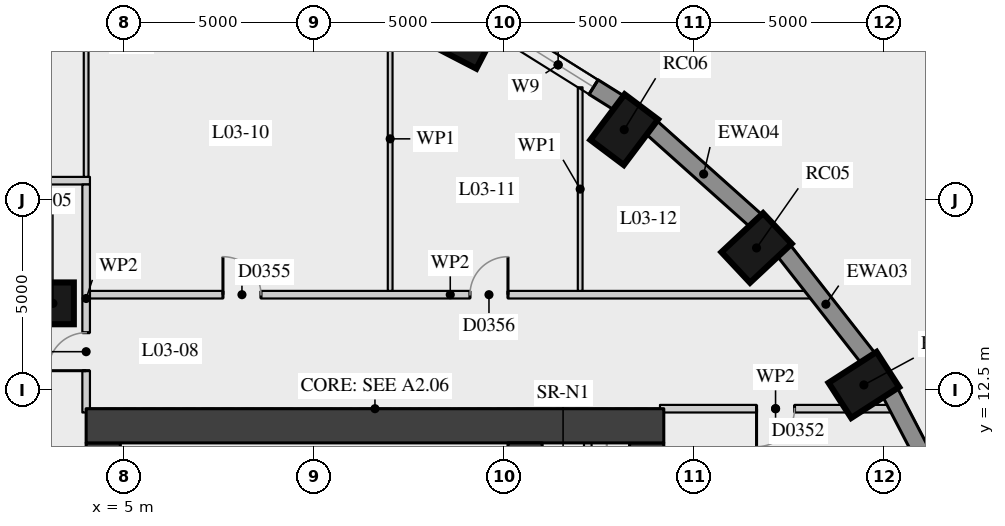
"""IFC4 building model, lengths in metres.
Left out: names, types, materials, properties, quantities, classifications, styles, units other than length and angle.
Written with IfcOpenShell. Run it as: python <this file> out.ifc"""

import sys

from ifc_helpers import new_model, si_unit, direction, frame, frame_2d, origin, origin_2d, place, context, subcontext, project, spatial, rectangle, extrude, element, fill, save


model = new_model("IFC4")
c1 = context("Model", 3, precision=1e-05, world=origin(), true_north=direction((0.0, 1.0)))
c2 = subcontext(c1, "Body", "Model", "MODEL_VIEW")
j1 = project(units=[si_unit("LENGTHUNIT", "METRE"), si_unit("PLANEANGLEUNIT", "RADIAN")], contexts=[c1])
p1 = place(None, origin())
s1 = spatial("IfcSite", under=j1, at=p1, CompositionType="ELEMENT")
p2 = place(p1, origin())
s2 = spatial("IfcBuilding", under=s1, at=p2, CompositionType="ELEMENT")
p3 = place(p2, frame((0.0, 0.0, 17.5)))
s3 = spatial("IfcBuildingStorey", under=s2, at=p3, CompositionType="ELEMENT", Elevation=17.5)
for number, where, z_axis, x_axis in (
    (1, (24.465, 12.625, 0.0), (0.0, 0.0, 1.0), (0.841, 0.541, 0.0)),
    (2, (21.641, 16.23, 0.0), (0.0, 0.0, 1.0), (0.73, 0.683, 0.0)),
    (3, (18.159, 19.343, 0.0), (0.0, 0.0, 1.0), (0.601, 0.799, 0.0)),
    (4, (14.125, 21.867, 0.0), (0.0, 0.0, 1.0), (0.46, 0.888, 0.0)),
):
    element("IfcColumn", number, at=place(p3, frame(where, z_axis=z_axis, x_axis=x_axis)), inside=s3, PredefinedType="COLUMN", context=c2, shape_type="SweptSolid", body=[
        extrude(rectangle(XDim=1.5, YDim=1.1, at=origin_2d()), origin(), (0.0, 0.0, 1.0), 4.2),
    ])
p4 = place(p3, frame((3.126, 14.772, 0.0), z_axis=(0.0, 0.0, 1.0), x_axis=(1.0, 0.0, 0.0)))
e5 = element("IfcColumn", 5, at=p4, inside=s3, PredefinedType="COLUMN", context=c2, shape_type="SweptSolid", body=[
    extrude(rectangle(XDim=1.1, YDim=1.1, at=origin_2d()), origin(), (0.0, 0.0, 1.0), 4.2),
])
p5 = place(p3, frame((26.786, 9.305, 0.0), z_axis=(0.0, 0.0, 1.0), x_axis=(-0.462492775226, 0.886623050041, 0.0)))
e6 = element("IfcWall", 6, at=p5, inside=s3, PredefinedType="SOLIDWALL", context=c2, shape_type="SweptSolid", body=[
    extrude(rectangle(XDim=3.532, YDim=0.45, at=frame_2d((1.766, 0.0))), origin(), (0.0, 0.0, 1.0), 3.92),
])
p6 = place(p3, frame((24.578, 13.328, 0.0), z_axis=(0.0, 0.0, 1.0), x_axis=(-0.616661975264, 0.787228053529, 0.0)))
e7 = element("IfcWall", 7, at=p6, inside=s3, PredefinedType="SOLIDWALL", context=c2, shape_type="SweptSolid", body=[
    extrude(rectangle(XDim=3.61, YDim=0.45, at=frame_2d((1.805, 0.0))), origin(), (0.0, 0.0, 1.0), 3.92),
])
p7 = place(p3, frame((21.627, 16.943, 0.0), z_axis=(0.0, 0.0, 1.0), x_axis=(-0.745526233716, 0.66647628228, 0.0)))
e8 = element("IfcWall", 8, at=p7, inside=s3, PredefinedType="SOLIDWALL", context=c2, shape_type="SweptSolid", body=[
    extrude(rectangle(XDim=3.697, YDim=0.45, at=frame_2d((1.848, 0.0))), origin(), (0.0, 0.0, 1.0), 3.92),
])
p8 = place(p3, frame((18.023, 20.044, 0.0), z_axis=(0.0, 0.0, 1.0), x_axis=(-0.847635480093, 0.530579016629, 0.0)))
e9 = element("IfcWall", 9, at=p8, inside=s3, PredefinedType="SOLIDWALL", context=c2, shape_type="SweptSolid", body=[
    extrude(rectangle(XDim=3.782, YDim=0.45, at=frame_2d((1.891, 0.0))), origin(), (0.0, 0.0, 1.0), 3.92),
])
p9 = place(p8, frame((0.791, 0.0, 0.4)))
e10 = element("IfcOpeningElement", 10, at=p9, cuts=e9, PredefinedType="OPENING", context=c2, shape_type="SweptSolid", body=[
    extrude(rectangle(XDim=2.2, YDim=2.8, at=frame_2d((1.1, 1.4))), frame((0.0, 0.235, 0.0), z_axis=(0.0, -1.0, 0.0), x_axis=(1.0, 0.0, 0.0)), (0.0, 0.0, 1.0), 0.47),
])
p10 = place(p3, frame((4.45, -11.1, 0.0), z_axis=(0.0, 0.0, 1.0), x_axis=(0.0, 1.0, 0.0)))
e11 = element("IfcWall", 11, at=p10, inside=s3, PredefinedType="SHEAR", context=c2, shape_type="SweptSolid", body=[
    extrude(rectangle(XDim=22.2, YDim=0.9, at=frame_2d((11.1, 0.0))), origin(), (0.0, 0.0, 1.0), 3.92),
])
p11 = place(p10, frame((2.35, 0.0, 0.0)))
e12 = element("IfcOpeningElement", 12, at=p11, cuts=e11, PredefinedType="OPENING", context=c2, shape_type="SweptSolid", body=[
    extrude(rectangle(XDim=1.5, YDim=2.1, at=frame_2d((0.75, 1.05))), frame((0.0, 0.46, 0.0), z_axis=(0.0, -1.0, 0.0), x_axis=(1.0, 0.0, 0.0)), (0.0, 0.0, 1.0), 0.92),
])
p12 = place(p10, frame((5.45, 0.0, 0.0)))
e13 = element("IfcOpeningElement", 13, at=p12, cuts=e11, PredefinedType="OPENING", context=c2, shape_type="SweptSolid", body=[
    extrude(rectangle(XDim=1.8, YDim=2.1, at=frame_2d((0.9, 1.05))), frame((0.0, 0.46, 0.0), z_axis=(0.0, -1.0, 0.0), x_axis=(1.0, 0.0, 0.0)), (0.0, 0.0, 1.0), 0.92),
])
p13 = place(p10, frame((7.95, 0.0, 0.0)))
e14 = element("IfcOpeningElement", 14, at=p13, cuts=e11, PredefinedType="OPENING", context=c2, shape_type="SweptSolid", body=[
    extrude(rectangle(XDim=1.1, YDim=2.1, at=frame_2d((0.55, 1.05))), frame((0.0, 0.46, 0.0), z_axis=(0.0, -1.0, 0.0), x_axis=(1.0, 0.0, 0.0)), (0.0, 0.0, 1.0), 0.92),
])
p14 = place(p10, frame((10.6, 0.0, 0.0)))
e15 = element("IfcOpeningElement", 15, at=p14, cuts=e11, PredefinedType="OPENING", context=c2, shape_type="SweptSolid", body=[
    extrude(rectangle(XDim=1.0, YDim=2.1, at=frame_2d((0.5, 1.05))), frame((0.0, 0.46, 0.0), z_axis=(0.0, -1.0, 0.0), x_axis=(1.0, 0.0, 0.0)), (0.0, 0.0, 1.0), 0.92),
])
p15 = place(p10, frame((13.15, 0.0, 0.0)))
e16 = element("IfcOpeningElement", 16, at=p15, cuts=e11, PredefinedType="OPENING", context=c2, shape_type="SweptSolid", body=[
    extrude(rectangle(XDim=1.1, YDim=2.1, at=frame_2d((0.55, 1.05))), frame((0.0, 0.46, 0.0), z_axis=(0.0, -1.0, 0.0), x_axis=(1.0, 0.0, 0.0)), (0.0, 0.0, 1.0), 0.92),
])
p16 = place(p10, frame((14.95, 0.0, 0.0)))
e17 = element("IfcOpeningElement", 17, at=p16, cuts=e11, PredefinedType="OPENING", context=c2, shape_type="SweptSolid", body=[
    extrude(rectangle(XDim=1.8, YDim=2.1, at=frame_2d((0.9, 1.05))), frame((0.0, 0.46, 0.0), z_axis=(0.0, -1.0, 0.0), x_axis=(1.0, 0.0, 0.0)), (0.0, 0.0, 1.0), 0.92),
])
p17 = place(p10, frame((18.35, 0.0, 0.0)))
e18 = element("IfcOpeningElement", 18, at=p17, cuts=e11, PredefinedType="OPENING", context=c2, shape_type="SweptSolid", body=[
    extrude(rectangle(XDim=1.5, YDim=2.1, at=frame_2d((0.75, 1.05))), frame((0.0, 0.46, 0.0), z_axis=(0.0, -1.0, 0.0), x_axis=(1.0, 0.0, 0.0)), (0.0, 0.0, 1.0), 0.92),
])
p18 = place(p3, frame((18.75, -11.1, 0.0), z_axis=(0.0, 0.0, 1.0), x_axis=(0.0, 1.0, 0.0)))
e19 = element("IfcWall", 19, at=p18, inside=s3, PredefinedType="SHEAR", context=c2, shape_type="SweptSolid", body=[
    extrude(rectangle(XDim=22.2, YDim=0.9, at=frame_2d((11.1, 0.0))), origin(), (0.0, 0.0, 1.0), 3.92),
])
p19 = place(p3, frame((4.0, 11.55, 0.0), z_axis=(0.0, 0.0, 1.0), x_axis=(1.0, 0.0, 0.0)))
e20 = element("IfcWall", 20, at=p19, inside=s3, PredefinedType="SHEAR", context=c2, shape_type="SweptSolid", body=[
    extrude(rectangle(XDim=15.2, YDim=0.9, at=frame_2d((7.6, 0.0))), origin(), (0.0, 0.0, 1.0), 3.92),
])
p20 = place(p3, frame((15.55, -11.1, 0.0), z_axis=(0.0, 0.0, 1.0), x_axis=(0.0, 1.0, 0.0)))
e21 = element("IfcWall", 21, at=p20, inside=s3, PredefinedType="SHEAR", context=c2, shape_type="SweptSolid", body=[
    extrude(rectangle(XDim=22.2, YDim=0.9, at=frame_2d((11.1, 0.0))), origin(), (0.0, 0.0, 1.0), 3.92),
])
p21 = place(p20, frame((15.6, 0.0, 0.0)))
e22 = element("IfcOpeningElement", 22, at=p21, cuts=e21, PredefinedType="OPENING", context=c2, shape_type="SweptSolid", body=[
    extrude(rectangle(XDim=1.0, YDim=2.1, at=frame_2d((0.5, 1.05))), frame((0.0, 0.46, 0.0), z_axis=(0.0, -1.0, 0.0), x_axis=(1.0, 0.0, 0.0)), (0.0, 0.0, 1.0), 0.92),
])
p22 = place(p20, frame((5.6, 0.0, 0.0)))
e23 = element("IfcOpeningElement", 23, at=p22, cuts=e21, PredefinedType="OPENING", context=c2, shape_type="SweptSolid", body=[
    extrude(rectangle(XDim=1.0, YDim=2.1, at=frame_2d((0.5, 1.05))), frame((0.0, 0.46, 0.0), z_axis=(0.0, -1.0, 0.0), x_axis=(1.0, 0.0, 0.0)), (0.0, 0.0, 1.0), 0.92),
])
p23 = place(p3, frame((17.2, 6.9, 0.0), z_axis=(0.0, 0.0, 1.0), x_axis=(0.0, 1.0, 0.0)))
e24 = element("IfcWall", 24, at=p23, inside=s3, PredefinedType="PARTITIONING", context=c2, shape_type="SweptSolid", body=[
    extrude(rectangle(XDim=4.2, YDim=0.2, at=frame_2d((2.1, 0.0))), origin(), (0.0, 0.0, 1.0), 3.92),
])
p24 = place(p3, frame((19.1, 12.0, 0.0), z_axis=(0.0, 0.0, 1.0), x_axis=(1.0, 0.0, 0.0)))
e25 = element("IfcWall", 25, at=p24, inside=s3, PredefinedType="PARTITIONING", context=c2, shape_type="SweptSolid", body=[
    extrude(rectangle(XDim=6.082, YDim=0.2, at=frame_2d((3.041, 0.0))), origin(), (0.0, 0.0, 1.0), 3.92),
])
p25 = place(p24, frame((2.541, 0.0, 0.0)))
e26 = element("IfcOpeningElement", 26, at=p25, cuts=e25, PredefinedType="OPENING", context=c2, shape_type="SweptSolid", body=[
    extrude(rectangle(XDim=1.0, YDim=2.1, at=frame_2d((0.5, 1.05))), frame((0.0, 0.11, 0.0), z_axis=(0.0, -1.0, 0.0), x_axis=(1.0, 0.0, 0.0)), (0.0, 0.0, 1.0), 0.22),
])
p26 = place(p3, frame((4.1, 15.0, 0.0), z_axis=(0.0, 0.0, 1.0), x_axis=(1.0, 0.0, 0.0)))
e27 = element("IfcWall", 27, at=p26, inside=s3, PredefinedType="PARTITIONING", context=c2, shape_type="SweptSolid", body=[
    extrude(rectangle(XDim=18.962, YDim=0.2, at=frame_2d((9.481, 0.0))), origin(), (0.0, 0.0, 1.0), 3.92),
])
p27 = place(p26, frame((3.5, 0.0, 0.0)))
e28 = element("IfcOpeningElement", 28, at=p27, cuts=e27, PredefinedType="OPENING", context=c2, shape_type="SweptSolid", body=[
    extrude(rectangle(XDim=1.0, YDim=2.1, at=frame_2d((0.5, 1.05))), frame((0.0, 0.11, 0.0), z_axis=(0.0, -1.0, 0.0), x_axis=(1.0, 0.0, 0.0)), (0.0, 0.0, 1.0), 0.22),
])
p28 = place(p26, frame((10.0, 0.0, 0.0)))
e29 = element("IfcOpeningElement", 29, at=p28, cuts=e27, PredefinedType="OPENING", context=c2, shape_type="SweptSolid", body=[
    extrude(rectangle(XDim=1.0, YDim=2.1, at=frame_2d((0.5, 1.05))), frame((0.0, 0.11, 0.0), z_axis=(0.0, -1.0, 0.0), x_axis=(1.0, 0.0, 0.0)), (0.0, 0.0, 1.0), 0.22),
])
p29 = place(p3, frame((-6.4, 18.0, 0.0), z_axis=(0.0, 0.0, 1.0), x_axis=(1.0, 0.0, 0.0)))
e30 = element("IfcWall", 30, at=p29, inside=s3, PredefinedType="PARTITIONING", context=c2, shape_type="SweptSolid", body=[
    extrude(rectangle(XDim=10.5, YDim=0.2, at=frame_2d((5.25, 0.0))), origin(), (0.0, 0.0, 1.0), 3.92),
])
p30 = place(p29, frame((4.05, 0.0, 0.0)))
e31 = element("IfcOpeningElement", 31, at=p30, cuts=e30, PredefinedType="OPENING", context=c2, shape_type="SweptSolid", body=[
    extrude(rectangle(XDim=2.4, YDim=2.4, at=frame_2d((1.2, 1.2))), frame((0.0, 0.11, 0.0), z_axis=(0.0, -1.0, 0.0), x_axis=(1.0, 0.0, 0.0)), (0.0, 0.0, 1.0), 0.22),
])
p31 = place(p3, frame((4.0, 11.9, 0.0), z_axis=(0.0, 0.0, 1.0), x_axis=(0.0, 1.0, 0.0)))
e32 = element("IfcWall", 32, at=p31, inside=s3, PredefinedType="PARTITIONING", context=c2, shape_type="SweptSolid", body=[
    extrude(rectangle(XDim=6.0, YDim=0.2, at=frame_2d((3.0, 0.0))), origin(), (0.0, 0.0, 1.0), 3.92),
])
p32 = place(p31, frame((1.1, 0.0, 0.0)))
e33 = element("IfcOpeningElement", 33, at=p32, cuts=e32, PredefinedType="OPENING", context=c2, shape_type="SweptSolid", body=[
    extrude(rectangle(XDim=1.0, YDim=2.1, at=frame_2d((0.5, 1.05))), frame((0.0, 0.11, 0.0), z_axis=(0.0, -1.0, 0.0), x_axis=(1.0, 0.0, 0.0)), (0.0, 0.0, 1.0), 0.22),
])
p33 = place(p3, frame((4.0, 18.1, 0.0), z_axis=(0.0, 0.0, 1.0), x_axis=(0.0, 1.0, 0.0)))
e34 = element("IfcWall", 34, at=p33, inside=s3, PredefinedType="PARTITIONING", context=c2, shape_type="SweptSolid", body=[
    extrude(rectangle(XDim=7.142, YDim=0.125, at=frame_2d((3.571, 0.0))), origin(), (0.0, 0.0, 1.0), 3.92),
])
p34 = place(p3, frame((12.0, 15.1, 0.0), z_axis=(0.0, 0.0, 1.0), x_axis=(0.0, 1.0, 0.0)))
e35 = element("IfcWall", 35, at=p34, inside=s3, PredefinedType="PARTITIONING", context=c2, shape_type="SweptSolid", body=[
    extrude(rectangle(XDim=8.002, YDim=0.125, at=frame_2d((4.001, 0.0))), origin(), (0.0, 0.0, 1.0), 3.92),
])
p35 = place(p3, frame((17.0, 15.1, 0.0), z_axis=(0.0, 0.0, 1.0), x_axis=(0.0, 1.0, 0.0)))
e36 = element("IfcWall", 36, at=p35, inside=s3, PredefinedType="PARTITIONING", context=c2, shape_type="SweptSolid", body=[
    extrude(rectangle(XDim=5.357, YDim=0.125, at=frame_2d((2.679, 0.0))), origin(), (0.0, 0.0, 1.0), 3.92),
])
p36 = place(p9, origin())
e37 = element("IfcWindow", 37, at=p36, inside=s3, PartitioningType="SINGLE_PANEL", PredefinedType="WINDOW", context=c2, shape_type="SweptSolid", body=[
    extrude(rectangle(XDim=2.2, YDim=2.8, at=frame_2d((1.1, 1.4))), frame((0.0, 0.035, 0.0), z_axis=(0.0, -1.0, 0.0), x_axis=(1.0, 0.0, 0.0)), (0.0, 0.0, 1.0), 0.06),
])
fill(e10, e37)
p37 = place(p32, origin())
e38 = element("IfcDoor", 38, at=p37, inside=s3, OperationType="SINGLE_SWING_LEFT", PredefinedType="DOOR", context=c2, shape_type="SweptSolid", body=[
    extrude(rectangle(XDim=1.0, YDim=2.1, at=frame_2d((0.5, 1.05))), frame((0.0, 0.025, 0.0), z_axis=(0.0, -1.0, 0.0), x_axis=(1.0, 0.0, 0.0)), (0.0, 0.0, 1.0), 0.05),
])
fill(e33, e38)
p38 = place(p27, origin())
e39 = element("IfcDoor", 39, at=p38, inside=s3, OperationType="SINGLE_SWING_LEFT", PredefinedType="DOOR", context=c2, shape_type="SweptSolid", body=[
    extrude(rectangle(XDim=1.0, YDim=2.1, at=frame_2d((0.5, 1.05))), frame((0.0, 0.025, 0.0), z_axis=(0.0, -1.0, 0.0), x_axis=(1.0, 0.0, 0.0)), (0.0, 0.0, 1.0), 0.05),
])
fill(e28, e39)
p39 = place(p28, origin())
e40 = element("IfcDoor", 40, at=p39, inside=s3, OperationType="SINGLE_SWING_RIGHT", PredefinedType="DOOR", context=c2, shape_type="SweptSolid", body=[
    extrude(rectangle(XDim=1.0, YDim=2.1, at=frame_2d((0.5, 1.05))), frame((0.0, 0.025, 0.0), z_axis=(0.0, -1.0, 0.0), x_axis=(1.0, 0.0, 0.0)), (0.0, 0.0, 1.0), 0.05),
])
fill(e29, e40)
p40 = place(p25, origin())
e41 = element("IfcDoor", 41, at=p40, inside=s3, OperationType="SINGLE_SWING_RIGHT", PredefinedType="DOOR", context=c2, shape_type="SweptSolid", body=[
    extrude(rectangle(XDim=1.0, YDim=2.1, at=frame_2d((0.5, 1.05))), frame((0.0, 0.025, 0.0), z_axis=(0.0, -1.0, 0.0), x_axis=(1.0, 0.0, 0.0)), (0.0, 0.0, 1.0), 0.05),
])
fill(e26, e41)
save(model, sys.argv[1])
